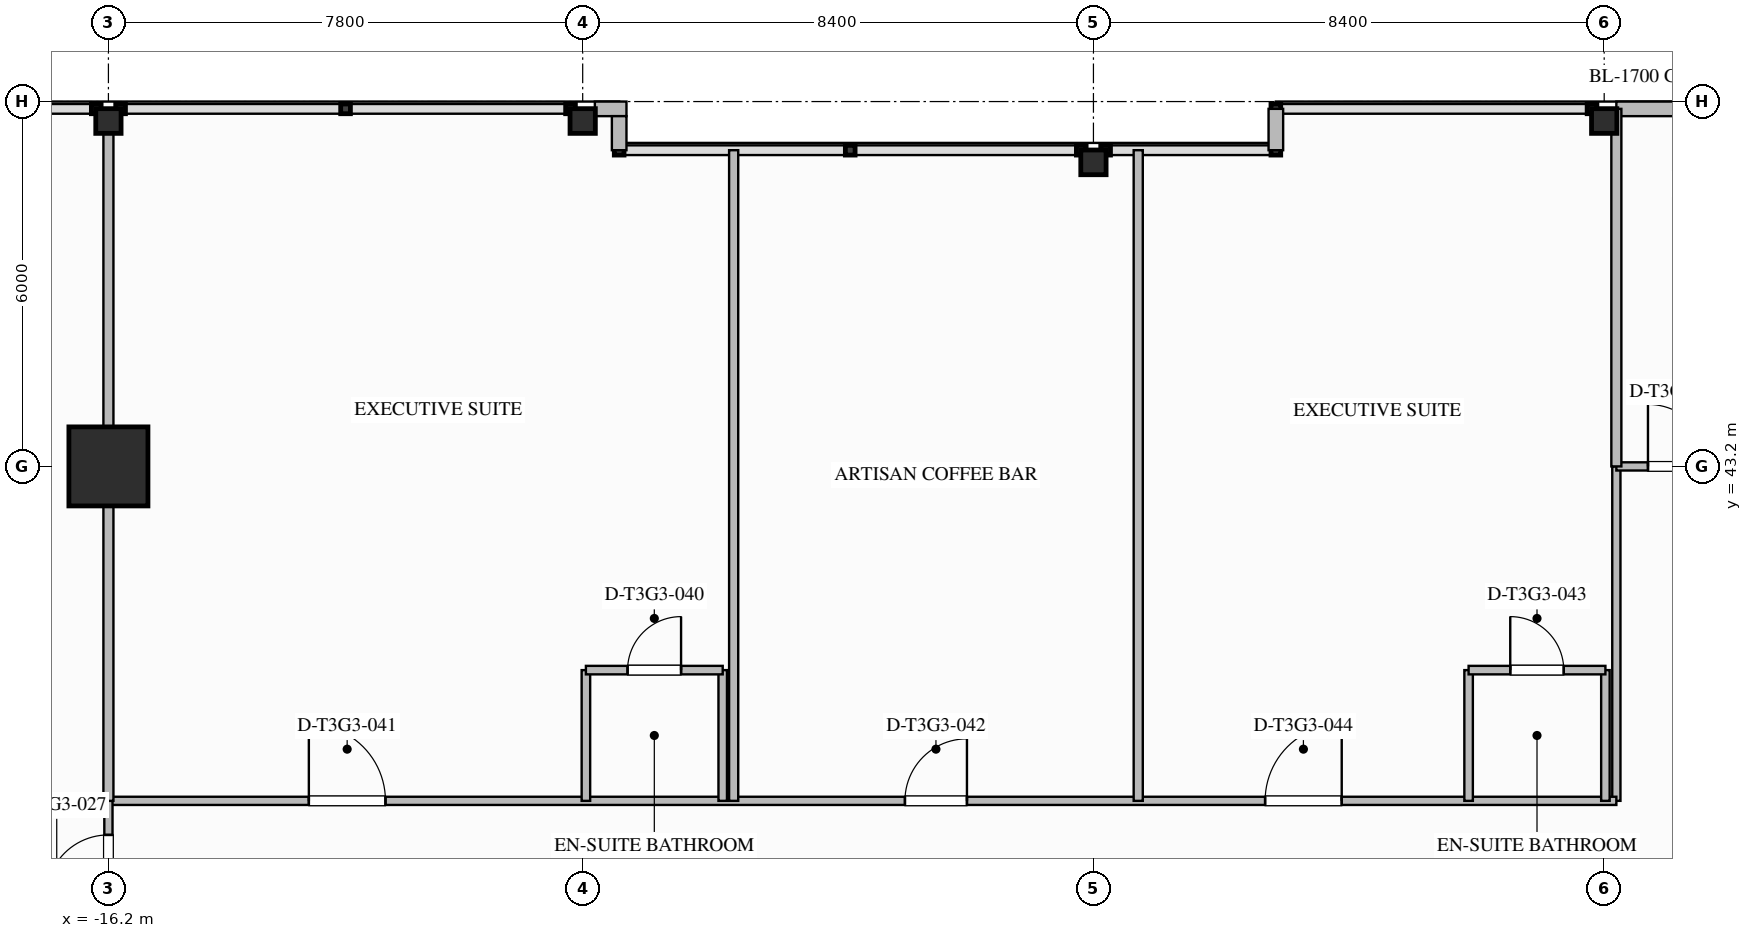
"""IFC4 building model, lengths in metres.
Left out: names, types, materials, properties, quantities, classifications, styles, units other than length and angle.
Written with IfcOpenShell. Run it as: python <this file> out.ifc"""

import sys

from ifc_helpers import new_model, si_unit, direction, frame, frame_2d, origin, origin_2d, place, context, subcontext, project, spatial, rectangle, i_section, extrude, element, fill, save


model = new_model("IFC4")
c1 = context("Model", 3, precision=1e-05, world=origin(), true_north=direction((0.0, 1.0)))
c2 = subcontext(c1, "Body", "Model", "MODEL_VIEW")
j1 = project(units=[si_unit("LENGTHUNIT", "METRE"), si_unit("PLANEANGLEUNIT", "RADIAN")], contexts=[c1])
p1 = place(None, origin())
s1 = spatial("IfcSite", under=j1, at=p1, CompositionType="ELEMENT")
p2 = place(p1, origin())
s2 = spatial("IfcBuilding", under=s1, at=p2, CompositionType="ELEMENT")
p3 = place(p2, frame((0.0, 0.0, 171.7)))
s3 = spatial("IfcBuildingStorey", under=s2, at=p3, CompositionType="ELEMENT", Elevation=171.7)
p4 = place(p3, frame((-16.2, 43.2, 0.0), z_axis=(0.0, 0.0, 1.0), x_axis=(1.0, 0.0, 0.0)))
e1 = element("IfcColumn", 1, at=p4, inside=s3, PredefinedType="COLUMN", context=c2, shape_type="SweptSolid", body=[
    extrude(rectangle(XDim=1.3, YDim=1.3, at=origin_2d()), origin(), (0.0, 0.0, 1.0), 3.55),
])
for number, where, z_axis, x_axis in (
    (2, (-16.2, 48.88, 0.0), (0.0, 0.0, 1.0), (0.0, 1.0, 0.0)),
    (3, (-8.4, 48.88, 0.0), (0.0, 0.0, 1.0), (0.0, 1.0, 0.0)),
    (4, (0.0, 48.2, 0.0), (0.0, 0.0, 1.0), (0.0, 1.0, 0.0)),
    (5, (8.4, 48.88, 0.0), (0.0, 0.0, 1.0), (0.0, 1.0, 0.0)),
):
    element("IfcColumn", number, at=place(p3, frame(where, z_axis=z_axis, x_axis=x_axis)), inside=s3, PredefinedType="COLUMN", context=c2, shape_type="SweptSolid", body=[
        extrude(i_section(OverallWidth=0.406, OverallDepth=0.416, WebThickness=0.03, FlangeThickness=0.048, FilletRadius=0.028, at=origin_2d()), origin(), (0.0, 0.0, 1.0), 3.547),
    ])
p5 = place(p3, frame((-8.2, 49.08, 0.0), z_axis=(0.0, 0.0, 1.0), x_axis=(1.0, 0.0, 0.0)))
e6 = element("IfcWall", 6, at=p5, inside=s3, PredefinedType="STANDARD", context=c2, shape_type="SweptSolid", body=[
    extrude(rectangle(XDim=0.52, YDim=0.24, at=frame_2d((0.26, 0.0))), origin(), (0.0, 0.0, 1.0), 3.29),
])
p6 = place(p3, frame((8.6, 49.08, 0.0), z_axis=(0.0, 0.0, 1.0), x_axis=(1.0, 0.0, 0.0)))
e7 = element("IfcWall", 7, at=p6, inside=s3, PredefinedType="STANDARD", context=c2, shape_type="SweptSolid", body=[
    extrude(rectangle(XDim=7.4, YDim=0.24, at=frame_2d((3.7, 0.0))), origin(), (0.0, 0.0, 1.0), 2.753),
])
p7 = place(p6, frame((4.6, 0.0, 0.0)))
e8 = element("IfcOpeningElement", 8, at=p7, cuts=e7, PredefinedType="OPENING", context=c2, shape_type="SweptSolid", body=[
    extrude(rectangle(XDim=1.0, YDim=2.2, at=frame_2d((0.5, 1.1))), frame((0.0, 0.13, 0.0), z_axis=(0.0, -1.0, 0.0), x_axis=(1.0, 0.0, 0.0)), (0.0, 0.0, 1.0), 0.26),
])
p8 = place(p6, frame((1.575, 0.0, 0.75)))
e9 = element("IfcOpeningElement", 9, at=p8, cuts=e7, PredefinedType="OPENING", context=c2, shape_type="SweptSolid", body=[
    extrude(rectangle(XDim=1.8, YDim=1.903, at=frame_2d((0.9, 0.952))), frame((0.0, 0.13, 0.0), z_axis=(0.0, -1.0, 0.0), x_axis=(1.0, 0.0, 0.0)), (0.0, 0.0, 1.0), 0.26),
])
p9 = place(p3, frame((-7.8, 48.96, 0.0), z_axis=(0.0, 0.0, 1.0), x_axis=(0.0, -1.0, 0.0)))
e10 = element("IfcWall", 10, at=p9, inside=s3, PredefinedType="STANDARD", context=c2, shape_type="SweptSolid", body=[
    extrude(rectangle(XDim=0.56, YDim=0.24, at=frame_2d((0.28, 0.0))), origin(), (0.0, 0.0, 1.0), 3.29),
])
p10 = place(p3, frame((3.0, 48.4, 0.0), z_axis=(0.0, 0.0, 1.0), x_axis=(0.0, 1.0, 0.0)))
e11 = element("IfcWall", 11, at=p10, inside=s3, PredefinedType="STANDARD", context=c2, shape_type="SweptSolid", body=[
    extrude(rectangle(XDim=0.68, YDim=0.24, at=frame_2d((0.34, 0.0))), origin(), (0.0, 0.0, 1.0), 3.29),
])
p11 = place(p3, frame((8.6, 37.7, 0.0), z_axis=(0.0, 0.0, 1.0), x_axis=(0.0, 1.0, 0.0)))
e12 = element("IfcWall", 12, at=p11, inside=s3, PredefinedType="PARTITIONING", context=c2, shape_type="SweptSolid", body=[
    extrude(rectangle(XDim=5.5, YDim=0.135, at=frame_2d((2.75, 0.0))), origin(), (0.0, 0.0, 1.0), 2.667),
])
p12 = place(p3, frame((-16.2, 37.7, 0.0), z_axis=(0.0, 0.0, 1.0), x_axis=(1.0, 0.0, 0.0)))
e13 = element("IfcWall", 13, at=p12, inside=s3, PredefinedType="PARTITIONING", context=c2, shape_type="SweptSolid", body=[
    extrude(rectangle(XDim=24.8, YDim=0.135, at=frame_2d((12.4, 0.0))), origin(), (0.0, 0.0, 1.0), 3.29),
])
p13 = place(p12, frame((3.296, 0.0, 0.0)))
e14 = element("IfcOpeningElement", 14, at=p13, cuts=e13, PredefinedType="OPENING", context=c2, shape_type="SweptSolid", body=[
    extrude(rectangle(XDim=1.26, YDim=2.2, at=frame_2d((0.63, 1.1))), frame((0.0, 0.077, 0.0), z_axis=(0.0, -1.0, 0.0), x_axis=(1.0, 0.0, 0.0)), (0.0, 0.0, 1.0), 0.155),
])
p14 = place(p12, frame((13.1, 0.0, 0.0)))
e15 = element("IfcOpeningElement", 15, at=p14, cuts=e13, PredefinedType="OPENING", context=c2, shape_type="SweptSolid", body=[
    extrude(rectangle(XDim=1.02, YDim=2.15, at=frame_2d((0.51, 1.075))), frame((0.0, 0.077, 0.0), z_axis=(0.0, -1.0, 0.0), x_axis=(1.0, 0.0, 0.0)), (0.0, 0.0, 1.0), 0.155),
])
p15 = place(p12, frame((19.023, 0.0, 0.0)))
e16 = element("IfcOpeningElement", 16, at=p15, cuts=e13, PredefinedType="OPENING", context=c2, shape_type="SweptSolid", body=[
    extrude(rectangle(XDim=1.26, YDim=2.2, at=frame_2d((0.63, 1.1))), frame((0.0, 0.077, 0.0), z_axis=(0.0, -1.0, 0.0), x_axis=(1.0, 0.0, 0.0)), (0.0, 0.0, 1.0), 0.155),
])
p16 = place(p3, frame((-16.2, 35.6, 0.0), z_axis=(0.0, 0.0, 1.0), x_axis=(0.0, 1.0, 0.0)))
e17 = element("IfcWall", 17, at=p16, inside=s3, PredefinedType="PARTITIONING", context=c2, shape_type="SweptSolid", body=[
    extrude(rectangle(XDim=2.1, YDim=0.135, at=frame_2d((1.05, 0.0))), origin(), (0.0, 0.0, 1.0), 2.58),
])
p17 = place(p16, frame((0.52, 0.0, 0.0)))
e18 = element("IfcOpeningElement", 18, at=p17, cuts=e17, PredefinedType="OPENING", context=c2, shape_type="SweptSolid", body=[
    extrude(rectangle(XDim=1.02, YDim=2.15, at=frame_2d((0.51, 1.075))), frame((0.0, 0.077, 0.0), z_axis=(0.0, -1.0, 0.0), x_axis=(1.0, 0.0, 0.0)), (0.0, 0.0, 1.0), 0.155),
])
p18 = place(p3, frame((8.6, 43.2, 0.0), z_axis=(0.0, 0.0, 1.0), x_axis=(1.0, 0.0, 0.0)))
e19 = element("IfcWall", 19, at=p18, inside=s3, PredefinedType="PARTITIONING", context=c2, shape_type="SweptSolid", body=[
    extrude(rectangle(XDim=2.8, YDim=0.135, at=frame_2d((1.4, 0.0))), origin(), (0.0, 0.0, 1.0), 2.58),
])
p19 = place(p18, frame((0.52, 0.0, 0.0)))
e20 = element("IfcOpeningElement", 20, at=p19, cuts=e19, PredefinedType="OPENING", context=c2, shape_type="SweptSolid", body=[
    extrude(rectangle(XDim=1.02, YDim=2.15, at=frame_2d((0.51, 1.075))), frame((0.0, 0.077, 0.0), z_axis=(0.0, -1.0, 0.0), x_axis=(1.0, 0.0, 0.0)), (0.0, 0.0, 1.0), 0.155),
])
p20 = place(p3, frame((-16.2, 37.7, 0.0), z_axis=(0.0, 0.0, 1.0), x_axis=(0.0, 1.0, 0.0)))
e21 = element("IfcWall", 21, at=p20, inside=s3, PredefinedType="PARTITIONING", context=c2, shape_type="SweptSolid", body=[
    extrude(rectangle(XDim=11.38, YDim=0.165, at=frame_2d((5.69, 0.0))), origin(), (0.0, 0.0, 1.0), 2.58),
])
p21 = place(p3, frame((8.6, 43.2, 0.0), z_axis=(0.0, 0.0, 1.0), x_axis=(0.0, 1.0, 0.0)))
e22 = element("IfcWall", 22, at=p21, inside=s3, PredefinedType="PARTITIONING", context=c2, shape_type="SweptSolid", body=[
    extrude(rectangle(XDim=5.88, YDim=0.165, at=frame_2d((2.94, 0.0))), origin(), (0.0, 0.0, 1.0), 2.58),
])
p22 = place(p3, frame((-8.347, 37.7, 0.0), z_axis=(0.0, 0.0, 1.0), x_axis=(0.0, 1.0, 0.0)))
e23 = element("IfcWall", 23, at=p22, inside=s3, PredefinedType="PLUMBINGWALL", context=c2, shape_type="SweptSolid", body=[
    extrude(rectangle(XDim=2.15, YDim=0.14, at=frame_2d((1.075, 0.0))), origin(), (0.0, 0.0, 1.0), 2.667),
])
p23 = place(p3, frame((-6.097, 37.7, 0.0), z_axis=(0.0, 0.0, 1.0), x_axis=(0.0, 1.0, 0.0)))
e24 = element("IfcWall", 24, at=p23, inside=s3, PredefinedType="PLUMBINGWALL", context=c2, shape_type="SweptSolid", body=[
    extrude(rectangle(XDim=2.15, YDim=0.14, at=frame_2d((1.075, 0.0))), origin(), (0.0, 0.0, 1.0), 3.29),
])
p24 = place(p3, frame((-8.347, 39.85, 0.0), z_axis=(0.0, 0.0, 1.0), x_axis=(1.0, 0.0, 0.0)))
e25 = element("IfcWall", 25, at=p24, inside=s3, PredefinedType="PLUMBINGWALL", context=c2, shape_type="SweptSolid", body=[
    extrude(rectangle(XDim=2.25, YDim=0.14, at=frame_2d((1.125, 0.0))), origin(), (0.0, 0.0, 1.0), 3.29),
])
p25 = place(p24, frame((0.685, 0.0, 0.0)))
e26 = element("IfcOpeningElement", 26, at=p25, cuts=e25, PredefinedType="OPENING", context=c2, shape_type="SweptSolid", body=[
    extrude(rectangle(XDim=0.88, YDim=2.1, at=frame_2d((0.44, 1.05))), frame((0.0, 0.08, 0.0), z_axis=(0.0, -1.0, 0.0), x_axis=(1.0, 0.0, 0.0)), (0.0, 0.0, 1.0), 0.16),
])
for number, where, z_axis, x_axis in (
    (27, (-5.917, 37.7, 0.0), (0.0, 0.0, 1.0), (0.0, 1.0, 0.0)),
    (28, (0.737, 37.7, 0.0), (0.0, 0.0, 1.0), (0.0, 1.0, 0.0)),
):
    element("IfcWall", number, at=place(p3, frame(where, z_axis=z_axis, x_axis=x_axis)), inside=s3, PredefinedType="PARTITIONING", context=c2, shape_type="SweptSolid", body=[
        extrude(rectangle(XDim=10.7, YDim=0.15, at=frame_2d((5.35, 0.0))), origin(), (0.0, 0.0, 1.0), 3.29),
    ])
p26 = place(p3, frame((6.17, 37.7, 0.0), z_axis=(0.0, 0.0, 1.0), x_axis=(0.0, 1.0, 0.0)))
e29 = element("IfcWall", 29, at=p26, inside=s3, PredefinedType="PLUMBINGWALL", context=c2, shape_type="SweptSolid", body=[
    extrude(rectangle(XDim=2.15, YDim=0.14, at=frame_2d((1.075, 0.0))), origin(), (0.0, 0.0, 1.0), 3.29),
])
p27 = place(p3, frame((8.42, 37.7, 0.0), z_axis=(0.0, 0.0, 1.0), x_axis=(0.0, 1.0, 0.0)))
e30 = element("IfcWall", 30, at=p27, inside=s3, PredefinedType="PLUMBINGWALL", context=c2, shape_type="SweptSolid", body=[
    extrude(rectangle(XDim=2.15, YDim=0.14, at=frame_2d((1.075, 0.0))), origin(), (0.0, 0.0, 1.0), 2.667),
])
p28 = place(p3, frame((6.17, 39.85, 0.0), z_axis=(0.0, 0.0, 1.0), x_axis=(1.0, 0.0, 0.0)))
e31 = element("IfcWall", 31, at=p28, inside=s3, PredefinedType="PLUMBINGWALL", context=c2, shape_type="SweptSolid", body=[
    extrude(rectangle(XDim=2.25, YDim=0.14, at=frame_2d((1.125, 0.0))), origin(), (0.0, 0.0, 1.0), 3.29),
])
p29 = place(p28, frame((0.685, 0.0, 0.0)))
e32 = element("IfcOpeningElement", 32, at=p29, cuts=e31, PredefinedType="OPENING", context=c2, shape_type="SweptSolid", body=[
    extrude(rectangle(XDim=0.88, YDim=2.1, at=frame_2d((0.44, 1.05))), frame((0.0, 0.08, 0.0), z_axis=(0.0, -1.0, 0.0), x_axis=(1.0, 0.0, 0.0)), (0.0, 0.0, 1.0), 0.16),
])
p30 = place(p17, origin())
e33 = element("IfcDoor", 33, at=p30, inside=s3, OperationType="SINGLE_SWING_LEFT", PredefinedType="DOOR", context=c2, shape_type="SweptSolid", body=[
    extrude(rectangle(XDim=1.02, YDim=2.15, at=frame_2d((0.51, 1.075))), frame((0.0, 0.025, 0.0), z_axis=(0.0, -1.0, 0.0), x_axis=(1.0, 0.0, 0.0)), (0.0, 0.0, 1.0), 0.05),
])
fill(e18, e33)
p31 = place(p19, origin())
e34 = element("IfcDoor", 34, at=p31, inside=s3, OperationType="SINGLE_SWING_LEFT", PredefinedType="DOOR", context=c2, shape_type="SweptSolid", body=[
    extrude(rectangle(XDim=1.02, YDim=2.15, at=frame_2d((0.51, 1.075))), frame((0.0, 0.025, 0.0), z_axis=(0.0, -1.0, 0.0), x_axis=(1.0, 0.0, 0.0)), (0.0, 0.0, 1.0), 0.05),
])
fill(e20, e34)
p32 = place(p25, origin())
e35 = element("IfcDoor", 35, at=p32, inside=s3, OperationType="SINGLE_SWING_RIGHT", PredefinedType="DOOR", context=c2, shape_type="SweptSolid", body=[
    extrude(rectangle(XDim=0.88, YDim=2.1, at=frame_2d((0.44, 1.05))), frame((0.0, 0.025, 0.0), z_axis=(0.0, -1.0, 0.0), x_axis=(1.0, 0.0, 0.0)), (0.0, 0.0, 1.0), 0.05),
])
fill(e26, e35)
p33 = place(p13, origin())
e36 = element("IfcDoor", 36, at=p33, inside=s3, OperationType="SINGLE_SWING_LEFT", PredefinedType="DOOR", context=c2, shape_type="SweptSolid", body=[
    extrude(rectangle(XDim=1.26, YDim=2.2, at=frame_2d((0.63, 1.1))), frame((0.0, 0.025, 0.0), z_axis=(0.0, -1.0, 0.0), x_axis=(1.0, 0.0, 0.0)), (0.0, 0.0, 1.0), 0.05),
])
fill(e14, e36)
p34 = place(p14, origin())
e37 = element("IfcDoor", 37, at=p34, inside=s3, OperationType="SINGLE_SWING_RIGHT", PredefinedType="DOOR", context=c2, shape_type="SweptSolid", body=[
    extrude(rectangle(XDim=1.02, YDim=2.15, at=frame_2d((0.51, 1.075))), frame((0.0, 0.025, 0.0), z_axis=(0.0, -1.0, 0.0), x_axis=(1.0, 0.0, 0.0)), (0.0, 0.0, 1.0), 0.05),
])
fill(e15, e37)
p35 = place(p29, origin())
e38 = element("IfcDoor", 38, at=p35, inside=s3, OperationType="SINGLE_SWING_LEFT", PredefinedType="DOOR", context=c2, shape_type="SweptSolid", body=[
    extrude(rectangle(XDim=0.88, YDim=2.1, at=frame_2d((0.44, 1.05))), frame((0.0, 0.025, 0.0), z_axis=(0.0, -1.0, 0.0), x_axis=(1.0, 0.0, 0.0)), (0.0, 0.0, 1.0), 0.05),
])
fill(e32, e38)
p36 = place(p15, origin())
e39 = element("IfcDoor", 39, at=p36, inside=s3, OperationType="SINGLE_SWING_RIGHT", PredefinedType="DOOR", context=c2, shape_type="SweptSolid", body=[
    extrude(rectangle(XDim=1.26, YDim=2.2, at=frame_2d((0.63, 1.1))), frame((0.0, 0.025, 0.0), z_axis=(0.0, -1.0, 0.0), x_axis=(1.0, 0.0, 0.0)), (0.0, 0.0, 1.0), 0.05),
])
fill(e16, e39)
save(model, sys.argv[1])
